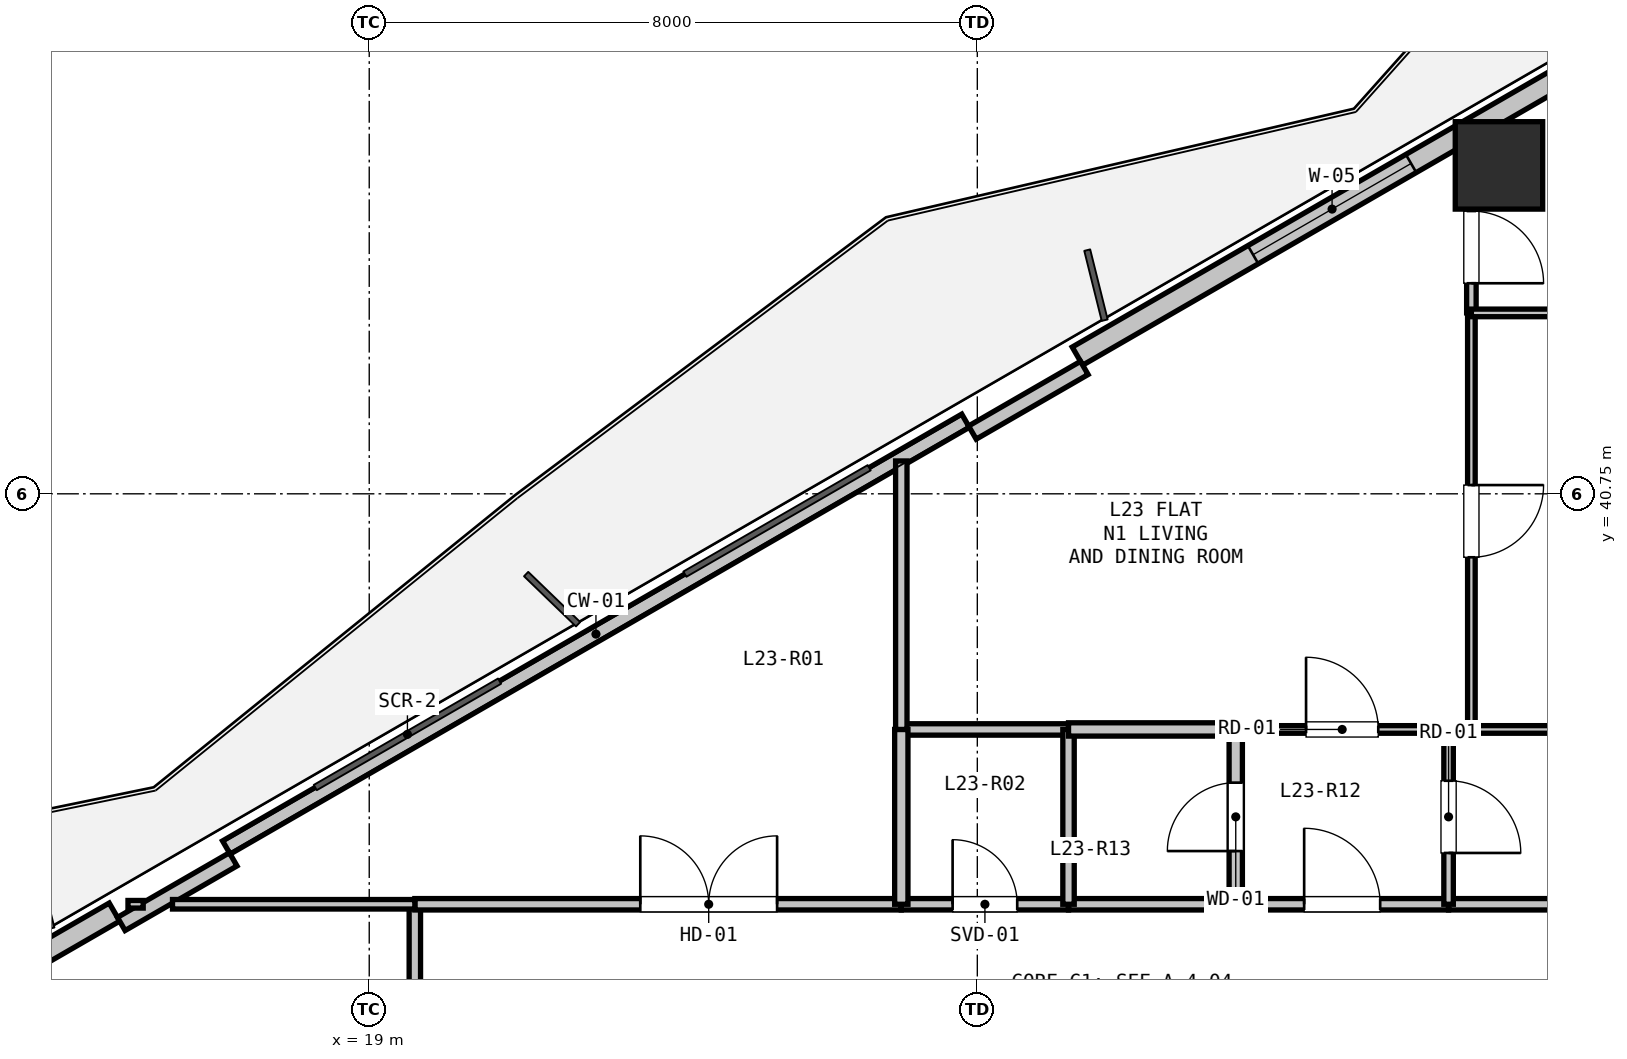
"""IFC4 building model, lengths in metres.
Left out: names, types, materials, properties, quantities, classifications, styles, units other than length and angle.
Written with IfcOpenShell. Run it as: python <this file> out.ifc"""

import sys

from ifc_helpers import new_model, si_unit, direction, frame, frame_2d, origin, origin_2d, place, context, subcontext, project, spatial, rectangle, hollow_rectangle, extrude, element, fill, save


model = new_model("IFC4")
c1 = context("Model", 3, precision=1e-05, world=origin(), true_north=direction((0.0, 1.0)))
c2 = subcontext(c1, "Body", "Model", "MODEL_VIEW")
j1 = project(units=[si_unit("LENGTHUNIT", "METRE"), si_unit("PLANEANGLEUNIT", "RADIAN")], contexts=[c1])
p1 = place(None, origin())
s1 = spatial("IfcSite", under=j1, at=p1, CompositionType="ELEMENT")
p2 = place(p1, origin())
s2 = spatial("IfcBuilding", under=s1, at=p2, CompositionType="ELEMENT")
p3 = place(p2, frame((0.0, 0.0, 86.7)))
s3 = spatial("IfcBuildingStorey", under=s2, at=p3, CompositionType="ELEMENT", Elevation=86.7)
p4 = place(p3, frame((33.863, 45.071, 0.0), z_axis=(0.0, 0.0, 1.0), x_axis=(1.0, 0.0, 0.0)))
e1 = element("IfcColumn", 1, at=p4, inside=s3, PredefinedType="COLUMN", context=c2, shape_type="SweptSolid", body=[
    extrude(hollow_rectangle(XDim=1.15, YDim=1.15, WallThickness=0.032, at=origin_2d()), origin(), (0.0, 0.0, 1.0), 3.3),
])
p5 = place(p3, frame((5.317, 29.282, 0.0), z_axis=(0.0, 0.0, 1.0), x_axis=(0.866023023012, 0.500004123596, 0.0)))
e2 = element("IfcWall", 2, at=p5, inside=s3, PredefinedType="SOLIDWALL", context=c2, shape_type="SweptSolid", body=[
    extrude(rectangle(XDim=11.93, YDim=0.275, at=frame_2d((5.965, 0.0))), origin(), (0.0, 0.0, 1.0), 2.67),
])
p6 = place(p5, frame((8.704, 0.0, 0.0)))
e3 = element("IfcOpeningElement", 3, at=p6, cuts=e2, PredefinedType="OPENING", context=c2, shape_type="SweptSolid", body=[
    extrude(rectangle(XDim=1.1, YDim=2.1, at=frame_2d((0.55, 1.05))), frame((0.0, 0.147, 0.0), z_axis=(0.0, -1.0, 0.0), x_axis=(1.0, 0.0, 0.0)), (0.0, 0.0, 1.0), 0.295),
])
p7 = place(p3, frame((17.12, 36.097, 0.0), z_axis=(0.0, 0.0, 1.0), x_axis=(0.866027010039, 0.499997217876, 0.0)))
e4 = element("IfcWall", 4, at=p7, inside=s3, PredefinedType="PARAPET", context=c2, shape_type="SweptSolid", body=[
    extrude(rectangle(XDim=11.229, YDim=0.2, at=frame_2d((5.615, 0.0))), origin(), (0.0, 0.0, 1.0), 0.2),
])
p8 = place(p3, frame((28.317, 42.562, 0.0), z_axis=(0.0, 0.0, 1.0), x_axis=(0.866023023012, 0.500004123596, 0.0)))
e5 = element("IfcWall", 5, at=p8, inside=s3, PredefinedType="SOLIDWALL", context=c2, shape_type="SweptSolid", body=[
    extrude(rectangle(XDim=11.93, YDim=0.275, at=frame_2d((5.965, 0.0))), origin(), (0.0, 0.0, 1.0), 2.67),
])
p9 = place(p8, frame((2.668, 0.0, 0.9)))
e6 = element("IfcOpeningElement", 6, at=p9, cuts=e5, PredefinedType="OPENING", context=c2, shape_type="SweptSolid", body=[
    extrude(rectangle(XDim=2.4, YDim=1.6, at=frame_2d((1.2, 0.8))), frame((0.0, 0.147, 0.0), z_axis=(0.0, -1.0, 0.0), x_axis=(1.0, 0.0, 0.0)), (0.0, 0.0, 1.0), 0.295),
])
p10 = place(p3, frame((15.738, 35.091, 0.0), z_axis=(0.0, 0.0, 1.0), x_axis=(0.866025371046, 0.500000056704, 0.0)))
e7 = element("IfcWall", 7, at=p10, inside=s3, PredefinedType="PARAPET", context=c2, shape_type="SweptSolid", body=[
    extrude(rectangle(XDim=1.7, YDim=0.2, at=frame_2d((0.85, 0.0))), origin(), (0.0, 0.0, 1.0), 2.67),
])
p11 = place(p3, frame((26.935, 41.556, 0.0), z_axis=(0.0, 0.0, 1.0), x_axis=(0.86605165483, 0.499954529098, 0.0)))
e8 = element("IfcWall", 8, at=p11, inside=s3, PredefinedType="PARAPET", context=c2, shape_type="SweptSolid", body=[
    extrude(rectangle(XDim=1.7, YDim=0.2, at=frame_2d((0.85, 0.0))), origin(), (0.0, 0.0, 1.0), 2.67),
])
p12 = place(p3, frame((19.6, 27.5, 0.0), z_axis=(0.0, 0.0, 1.0), x_axis=(0.0, 1.0, 0.0)))
e9 = element("IfcWall", 9, at=p12, inside=s3, PredefinedType="PARTITIONING", context=c2, shape_type="SweptSolid", body=[
    extrude(rectangle(XDim=7.85, YDim=0.15, at=frame_2d((3.925, 0.0))), origin(), (0.0, 0.0, 1.0), 2.423),
])
p13 = place(p12, frame((3.025, 0.0, 0.0)))
e10 = element("IfcOpeningElement", 10, at=p13, cuts=e9, PredefinedType="OPENING", context=c2, shape_type="SweptSolid", body=[
    extrude(rectangle(XDim=1.8, YDim=2.2, at=frame_2d((0.9, 1.1))), frame((0.0, 0.085, 0.0), z_axis=(0.0, -1.0, 0.0), x_axis=(1.0, 0.0, 0.0)), (0.0, 0.0, 1.0), 0.17),
])
p14 = place(p3, frame((19.6, 35.35, 0.0), z_axis=(0.0, 0.0, 1.0), x_axis=(1.0, 0.0, 0.0)))
e11 = element("IfcWall", 11, at=p14, inside=s3, PredefinedType="PARTITIONING", context=c2, shape_type="SweptSolid", body=[
    extrude(rectangle(XDim=6.4, YDim=0.15, at=frame_2d((3.2, 0.0))), origin(), (0.0, 0.0, 1.0), 3.05),
])
p15 = place(p14, frame((2.966, 0.0, 0.0)))
e12 = element("IfcOpeningElement", 12, at=p15, cuts=e11, PredefinedType="OPENING", context=c2, shape_type="SweptSolid", body=[
    extrude(rectangle(XDim=1.8, YDim=2.2, at=frame_2d((0.9, 1.1))), frame((0.0, 0.085, 0.0), z_axis=(0.0, -1.0, 0.0), x_axis=(1.0, 0.0, 0.0)), (0.0, 0.0, 1.0), 0.17),
])
p16 = place(p3, frame((26.0, 35.35, 0.0), z_axis=(0.0, 0.0, 1.0), x_axis=(1.0, 0.0, 0.0)))
e13 = element("IfcWall", 13, at=p16, inside=s3, PredefinedType="PARTITIONING", context=c2, shape_type="SweptSolid", body=[
    extrude(rectangle(XDim=2.2, YDim=0.15, at=frame_2d((1.1, 0.0))), origin(), (0.0, 0.0, 1.0), 3.05),
])
p17 = place(p16, frame((0.675, 0.0, 0.0)))
e14 = element("IfcOpeningElement", 14, at=p17, cuts=e13, PredefinedType="OPENING", context=c2, shape_type="SweptSolid", body=[
    extrude(rectangle(XDim=0.85, YDim=2.1, at=frame_2d((0.425, 1.05))), frame((0.0, 0.085, 0.0), z_axis=(0.0, -1.0, 0.0), x_axis=(1.0, 0.0, 0.0)), (0.0, 0.0, 1.0), 0.17),
])
p18 = place(p3, frame((28.2, 35.35, 0.0), z_axis=(0.0, 0.0, 1.0), x_axis=(1.0, 0.0, 0.0)))
e15 = element("IfcWall", 15, at=p18, inside=s3, PredefinedType="PARTITIONING", context=c2, shape_type="SweptSolid", body=[
    extrude(rectangle(XDim=2.2, YDim=0.15, at=frame_2d((1.1, 0.0))), origin(), (0.0, 0.0, 1.0), 3.05),
])
p19 = place(p3, frame((30.4, 35.35, 0.0), z_axis=(0.0, 0.0, 1.0), x_axis=(1.0, 0.0, 0.0)))
e16 = element("IfcWall", 16, at=p19, inside=s3, PredefinedType="PARTITIONING", context=c2, shape_type="SweptSolid", body=[
    extrude(rectangle(XDim=2.8, YDim=0.15, at=frame_2d((1.4, 0.0))), origin(), (0.0, 0.0, 1.0), 3.05),
])
p20 = place(p19, frame((0.9, 0.0, 0.0)))
e17 = element("IfcOpeningElement", 17, at=p20, cuts=e16, PredefinedType="OPENING", context=c2, shape_type="SweptSolid", body=[
    extrude(rectangle(XDim=1.0, YDim=2.15, at=frame_2d((0.5, 1.075))), frame((0.0, 0.085, 0.0), z_axis=(0.0, -1.0, 0.0), x_axis=(1.0, 0.0, 0.0)), (0.0, 0.0, 1.0), 0.17),
])
p21 = place(p3, frame((33.2, 35.35, 0.0), z_axis=(0.0, 0.0, 1.0), x_axis=(1.0, 0.0, 0.0)))
e18 = element("IfcWall", 18, at=p21, inside=s3, PredefinedType="PARTITIONING", context=c2, shape_type="SweptSolid", body=[
    extrude(rectangle(XDim=2.6, YDim=0.15, at=frame_2d((1.3, 0.0))), origin(), (0.0, 0.0, 1.0), 3.05),
])
p22 = place(p3, frame((30.4, 37.65, 0.0), z_axis=(0.0, 0.0, 1.0), x_axis=(1.0, 0.0, 0.0)))
e19 = element("IfcWall", 19, at=p22, inside=s3, PredefinedType="PARTITIONING", context=c2, shape_type="SweptSolid", body=[
    extrude(rectangle(XDim=2.8, YDim=0.1, at=frame_2d((1.4, 0.0))), origin(), (0.0, 0.0, 1.0), 3.05),
])
p23 = place(p22, frame((0.925, 0.0, 0.0)))
e20 = element("IfcOpeningElement", 20, at=p23, cuts=e19, PredefinedType="OPENING", context=c2, shape_type="SweptSolid", body=[
    extrude(rectangle(XDim=0.95, YDim=2.1, at=frame_2d((0.475, 1.05))), frame((0.0, 0.06, 0.0), z_axis=(0.0, -1.0, 0.0), x_axis=(1.0, 0.0, 0.0)), (0.0, 0.0, 1.0), 0.12),
])
p24 = place(p3, frame((33.2, 37.65, 0.0), z_axis=(0.0, 0.0, 1.0), x_axis=(0.0, -1.0, 0.0)))
e21 = element("IfcWall", 21, at=p24, inside=s3, PredefinedType="PARTITIONING", context=c2, shape_type="SweptSolid", body=[
    extrude(rectangle(XDim=2.3, YDim=0.125, at=frame_2d((1.15, 0.0))), origin(), (0.0, 0.0, 1.0), 3.05),
])
p25 = place(p24, frame((0.675, 0.0, 0.0)))
e22 = element("IfcOpeningElement", 22, at=p25, cuts=e21, PredefinedType="OPENING", context=c2, shape_type="SweptSolid", body=[
    extrude(rectangle(XDim=0.95, YDim=2.1, at=frame_2d((0.475, 1.05))), frame((0.0, 0.073, 0.0), z_axis=(0.0, -1.0, 0.0), x_axis=(1.0, 0.0, 0.0)), (0.0, 0.0, 1.0), 0.145),
])
p26 = place(p3, frame((30.4, 35.35, 0.0), z_axis=(0.0, 0.0, 1.0), x_axis=(0.0, 1.0, 0.0)))
e23 = element("IfcWall", 23, at=p26, inside=s3, PredefinedType="PLUMBINGWALL", context=c2, shape_type="SweptSolid", body=[
    extrude(rectangle(XDim=2.3, YDim=0.175, at=frame_2d((1.15, 0.0))), origin(), (0.0, 0.0, 1.0), 3.05),
])
p27 = place(p26, frame((0.7, 0.0, 0.0)))
e24 = element("IfcOpeningElement", 24, at=p27, cuts=e23, PredefinedType="OPENING", context=c2, shape_type="SweptSolid", body=[
    extrude(rectangle(XDim=0.9, YDim=2.1, at=frame_2d((0.45, 1.05))), frame((0.0, 0.097, 0.0), z_axis=(0.0, -1.0, 0.0), x_axis=(1.0, 0.0, 0.0)), (0.0, 0.0, 1.0), 0.195),
])
p28 = place(p3, frame((26.0, 37.65, 0.0), z_axis=(0.0, 0.0, 1.0), x_axis=(1.0, 0.0, 0.0)))
e25 = element("IfcWall", 25, at=p28, inside=s3, PredefinedType="PARTITIONING", context=c2, shape_type="SweptSolid", body=[
    extrude(rectangle(XDim=2.2, YDim=0.15, at=frame_2d((1.1, 0.0))), origin(), (0.0, 0.0, 1.0), 3.05),
])
p29 = place(p3, frame((28.2, 37.65, 0.0), z_axis=(0.0, 0.0, 1.0), x_axis=(0.0, -1.0, 0.0)))
e26 = element("IfcWall", 26, at=p29, inside=s3, PredefinedType="PARTITIONING", context=c2, shape_type="SweptSolid", body=[
    extrude(rectangle(XDim=2.3, YDim=0.15, at=frame_2d((1.15, 0.0))), origin(), (0.0, 0.0, 1.0), 3.05),
])
p30 = place(p3, frame((26.0, 35.35, 0.0), z_axis=(0.0, 0.0, 1.0), x_axis=(0.0, 1.0, 0.0)))
e27 = element("IfcWall", 27, at=p30, inside=s3, PredefinedType="PLUMBINGWALL", context=c2, shape_type="SweptSolid", body=[
    extrude(rectangle(XDim=2.3, YDim=0.175, at=frame_2d((1.15, 0.0))), origin(), (0.0, 0.0, 1.0), 3.05),
])
p31 = place(p3, frame((28.2, 37.65, 0.0), z_axis=(0.0, 0.0, 1.0), x_axis=(1.0, 0.0, 0.0)))
e28 = element("IfcWall", 28, at=p31, inside=s3, PredefinedType="PLUMBINGWALL", context=c2, shape_type="SweptSolid", body=[
    extrude(rectangle(XDim=2.2, YDim=0.175, at=frame_2d((1.1, 0.0))), origin(), (0.0, 0.0, 1.0), 3.05),
])
p32 = place(p3, frame((33.2, 37.65, 0.0), z_axis=(0.0, 0.0, 1.0), x_axis=(1.0, 0.0, 0.0)))
e29 = element("IfcWall", 29, at=p32, inside=s3, PredefinedType="PARTITIONING", context=c2, shape_type="SweptSolid", body=[
    extrude(rectangle(XDim=0.3, YDim=0.125, at=frame_2d((0.15, 0.0))), origin(), (0.0, 0.0, 1.0), 3.05),
])
p33 = place(p3, frame((33.5, 37.65, 0.0), z_axis=(0.0, 0.0, 1.0), x_axis=(1.0, 0.0, 0.0)))
e30 = element("IfcWall", 30, at=p33, inside=s3, PredefinedType="PARTITIONING", context=c2, shape_type="SweptSolid", body=[
    extrude(rectangle(XDim=4.77, YDim=0.1, at=frame_2d((2.385, 0.0))), origin(), (0.0, 0.0, 1.0), 2.423),
])
p34 = place(p3, frame((26.0, 41.182, 0.0), z_axis=(0.0, 0.0, 1.0), x_axis=(0.0, -1.0, 0.0)))
e31 = element("IfcWall", 31, at=p34, inside=s3, PredefinedType="PARTITIONING", context=c2, shape_type="SweptSolid", body=[
    extrude(rectangle(XDim=3.532, YDim=0.15, at=frame_2d((1.766, 0.0))), origin(), (0.0, 0.0, 1.0), 2.365),
])
p35 = place(p3, frame((19.6, 35.35, 0.0), z_axis=(0.0, 0.0, 1.0), x_axis=(-1.0, 0.0, 0.0)))
e32 = element("IfcWall", 32, at=p35, inside=s3, PredefinedType="PARTITIONING", context=c2, shape_type="SweptSolid", body=[
    extrude(rectangle(XDim=3.188, YDim=0.125, at=frame_2d((1.594, 0.0))), origin(), (0.0, 0.0, 1.0), 2.365),
])
p36 = place(p3, frame((16.026, 35.35, 0.0), z_axis=(0.0, 0.0, 1.0), x_axis=(-1.0, 0.0, 0.0)))
e33 = element("IfcWall", 33, at=p36, inside=s3, PredefinedType="PARTITIONING", context=c2, shape_type="SweptSolid", body=[
    extrude(rectangle(XDim=0.2, YDim=0.1, at=frame_2d((0.1, 0.0))), origin(), (0.0, 0.0, 1.0), 3.05),
])
p37 = place(p3, frame((33.5, 45.367, 0.0), z_axis=(0.0, 0.0, 1.0), x_axis=(0.0, -1.0, 0.0)))
e34 = element("IfcWall", 34, at=p37, inside=s3, PredefinedType="PARTITIONING", context=c2, shape_type="SweptSolid", body=[
    extrude(rectangle(XDim=2.237, YDim=0.125, at=frame_2d((1.119, 0.0))), origin(), (0.0, 0.0, 1.0), 2.66),
])
p38 = place(p37, frame((0.897, 0.0, 0.0)))
e35 = element("IfcOpeningElement", 35, at=p38, cuts=e34, PredefinedType="OPENING", context=c2, shape_type="SweptSolid", body=[
    extrude(rectangle(XDim=0.95, YDim=2.1, at=frame_2d((0.475, 1.05))), frame((0.0, 0.073, 0.0), z_axis=(0.0, -1.0, 0.0), x_axis=(1.0, 0.0, 0.0)), (0.0, 0.0, 1.0), 0.145),
])
p39 = place(p3, frame((33.5, 43.13, 0.0), z_axis=(0.0, 0.0, 1.0), x_axis=(0.0, -1.0, 0.0)))
e36 = element("IfcWall", 36, at=p39, inside=s3, PredefinedType="PARTITIONING", context=c2, shape_type="SweptSolid", body=[
    extrude(rectangle(XDim=5.48, YDim=0.1, at=frame_2d((2.74, 0.0))), origin(), (0.0, 0.0, 1.0), 3.05),
])
p40 = place(p39, frame((2.265, 0.0, 0.0)))
e37 = element("IfcOpeningElement", 37, at=p40, cuts=e36, PredefinedType="OPENING", context=c2, shape_type="SweptSolid", body=[
    extrude(rectangle(XDim=0.95, YDim=2.1, at=frame_2d((0.475, 1.05))), frame((0.0, 0.06, 0.0), z_axis=(0.0, -1.0, 0.0), x_axis=(1.0, 0.0, 0.0)), (0.0, 0.0, 1.0), 0.12),
])
p41 = place(p3, frame((33.5, 43.13, 0.0), z_axis=(0.0, 0.0, 1.0), x_axis=(1.0, 0.0, 0.0)))
e38 = element("IfcWall", 38, at=p41, inside=s3, PredefinedType="PARTITIONING", context=c2, shape_type="SweptSolid", body=[
    extrude(rectangle(XDim=4.77, YDim=0.1, at=frame_2d((2.385, 0.0))), origin(), (0.0, 0.0, 1.0), 2.423),
])
p42 = place(p41, frame((1.91, 0.0, 0.0)))
e39 = element("IfcOpeningElement", 39, at=p42, cuts=e38, PredefinedType="OPENING", context=c2, shape_type="SweptSolid", body=[
    extrude(rectangle(XDim=0.95, YDim=2.1, at=frame_2d((0.475, 1.05))), frame((0.0, 0.06, 0.0), z_axis=(0.0, -1.0, 0.0), x_axis=(1.0, 0.0, 0.0)), (0.0, 0.0, 1.0), 0.12),
])
p43 = place(p9, origin())
e40 = element("IfcWindow", 40, at=p43, inside=s3, PartitioningType="SINGLE_PANEL", PredefinedType="WINDOW", context=c2, shape_type="SweptSolid", body=[
    extrude(rectangle(XDim=2.4, YDim=1.6, at=frame_2d((1.2, 0.8))), frame((0.0, 0.03, 0.0), z_axis=(0.0, -1.0, 0.0), x_axis=(1.0, 0.0, 0.0)), (0.0, 0.0, 1.0), 0.06),
])
fill(e6, e40)
p44 = place(p20, origin())
e41 = element("IfcDoor", 41, at=p44, inside=s3, OperationType="SINGLE_SWING_LEFT", PredefinedType="DOOR", context=c2, shape_type="SweptSolid", body=[
    extrude(rectangle(XDim=1.0, YDim=2.15, at=frame_2d((0.5, 1.075))), frame((0.0, 0.025, 0.0), z_axis=(0.0, -1.0, 0.0), x_axis=(1.0, 0.0, 0.0)), (0.0, 0.0, 1.0), 0.05),
])
fill(e17, e41)
p45 = place(p17, origin())
e42 = element("IfcDoor", 42, at=p45, inside=s3, OperationType="SINGLE_SWING_LEFT", PredefinedType="DOOR", context=c2, shape_type="SweptSolid", body=[
    extrude(rectangle(XDim=0.85, YDim=2.1, at=frame_2d((0.425, 1.05))), frame((0.0, 0.025, 0.0), z_axis=(0.0, -1.0, 0.0), x_axis=(1.0, 0.0, 0.0)), (0.0, 0.0, 1.0), 0.05),
])
fill(e14, e42)
p46 = place(p15, origin())
e43 = element("IfcDoor", 43, at=p46, inside=s3, OperationType="DOUBLE_DOOR_SINGLE_SWING", PredefinedType="DOOR", context=c2, shape_type="SweptSolid", body=[
    extrude(rectangle(XDim=1.8, YDim=2.2, at=frame_2d((0.9, 1.1))), frame((0.0, 0.025, 0.0), z_axis=(0.0, -1.0, 0.0), x_axis=(1.0, 0.0, 0.0)), (0.0, 0.0, 1.0), 0.05),
])
fill(e12, e43)
p47 = place(p27, origin())
e44 = element("IfcDoor", 44, at=p47, inside=s3, OperationType="SINGLE_SWING_LEFT", PredefinedType="DOOR", context=c2, shape_type="SweptSolid", body=[
    extrude(rectangle(XDim=0.9, YDim=2.1, at=frame_2d((0.45, 1.05))), frame((0.0, 0.025, 0.0), z_axis=(0.0, -1.0, 0.0), x_axis=(1.0, 0.0, 0.0)), (0.0, 0.0, 1.0), 0.05),
])
fill(e24, e44)
p48 = place(p25, origin())
e45 = element("IfcDoor", 45, at=p48, inside=s3, OperationType="SINGLE_SWING_RIGHT", PredefinedType="DOOR", context=c2, shape_type="SweptSolid", body=[
    extrude(rectangle(XDim=0.95, YDim=2.1, at=frame_2d((0.475, 1.05))), frame((0.0, 0.025, 0.0), z_axis=(0.0, -1.0, 0.0), x_axis=(1.0, 0.0, 0.0)), (0.0, 0.0, 1.0), 0.05),
])
fill(e22, e45)
p49 = place(p23, origin())
e46 = element("IfcDoor", 46, at=p49, inside=s3, OperationType="SINGLE_SWING_LEFT", PredefinedType="DOOR", context=c2, shape_type="SweptSolid", body=[
    extrude(rectangle(XDim=0.95, YDim=2.1, at=frame_2d((0.475, 1.05))), frame((0.0, 0.025, 0.0), z_axis=(0.0, -1.0, 0.0), x_axis=(1.0, 0.0, 0.0)), (0.0, 0.0, 1.0), 0.05),
])
fill(e20, e46)
p50 = place(p40, origin())
e47 = element("IfcDoor", 47, at=p50, inside=s3, OperationType="SINGLE_SWING_LEFT", PredefinedType="DOOR", context=c2, shape_type="SweptSolid", body=[
    extrude(rectangle(XDim=0.95, YDim=2.1, at=frame_2d((0.475, 1.05))), frame((0.0, 0.025, 0.0), z_axis=(0.0, -1.0, 0.0), x_axis=(1.0, 0.0, 0.0)), (0.0, 0.0, 1.0), 0.05),
])
fill(e37, e47)
p51 = place(p38, origin())
e48 = element("IfcDoor", 48, at=p51, inside=s3, OperationType="SINGLE_SWING_RIGHT", PredefinedType="DOOR", context=c2, shape_type="SweptSolid", body=[
    extrude(rectangle(XDim=0.95, YDim=2.1, at=frame_2d((0.475, 1.05))), frame((0.0, 0.025, 0.0), z_axis=(0.0, -1.0, 0.0), x_axis=(1.0, 0.0, 0.0)), (0.0, 0.0, 1.0), 0.05),
])
fill(e35, e48)
save(model, sys.argv[1])
